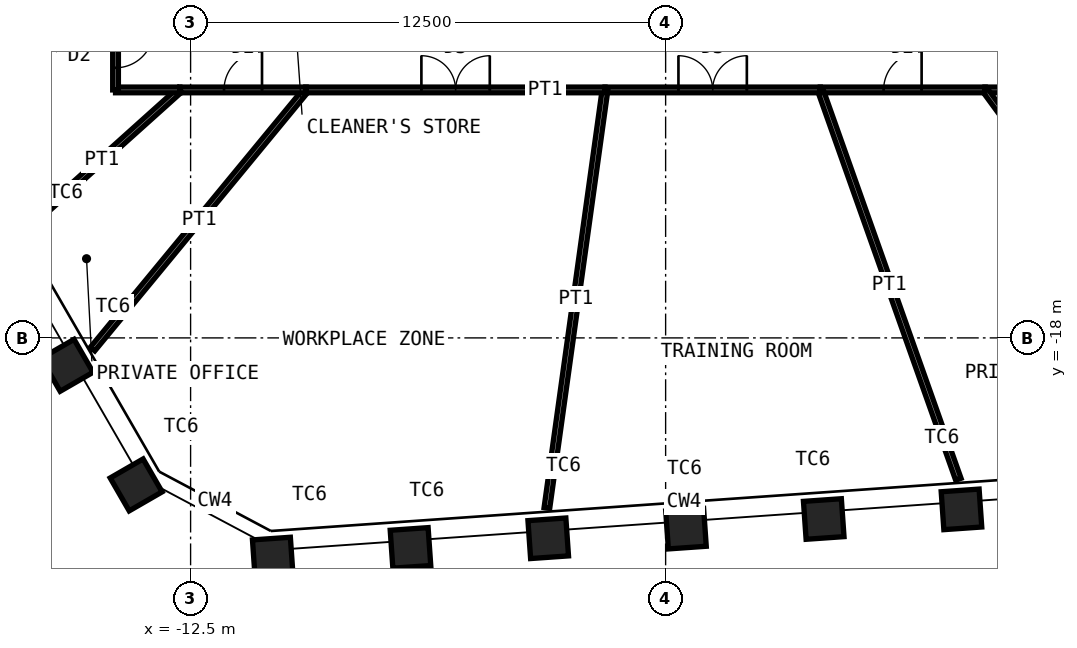
"""IFC4 building model, lengths in metres.
Left out: names, types, materials, properties, quantities, classifications, styles, units other than length and angle.
Written with IfcOpenShell. Run it as: python <this file> out.ifc"""

import sys

from ifc_helpers import new_model, si_unit, direction, frame, frame_2d, origin, origin_2d, place, context, subcontext, project, spatial, rectangle, hollow_rectangle, extrude, element, fill, save


model = new_model("IFC4")
c1 = context("Model", 3, precision=1e-05, world=origin(), true_north=direction((0.0, 1.0)))
c2 = subcontext(c1, "Body", "Model", "MODEL_VIEW")
j1 = project(units=[si_unit("LENGTHUNIT", "METRE"), si_unit("PLANEANGLEUNIT", "RADIAN")], contexts=[c1])
p1 = place(None, origin())
s1 = spatial("IfcSite", under=j1, at=p1, CompositionType="ELEMENT")
p2 = place(p1, origin())
s2 = spatial("IfcBuilding", under=s1, at=p2, CompositionType="ELEMENT")
p3 = place(p2, frame((0.0, 0.0, 235.0)))
s3 = spatial("IfcBuildingStorey", under=s2, at=p3, CompositionType="ELEMENT", Elevation=235.0)
for number, where, z_axis, x_axis in (
    (1, (7.785, -22.512, 0.0), (0.0, 0.0, 1.0), (0.998, 0.07, 0.0)),
    (2, (4.16, -22.765, 0.0), (0.0, 0.0, 1.0), (0.998, 0.07, 0.0)),
    (3, (0.536, -23.019, 0.0), (0.0, 0.0, 1.0), (0.998, 0.07, 0.0)),
    (4, (-3.089, -23.272, 0.0), (0.0, 0.0, 1.0), (0.998, 0.07, 0.0)),
    (5, (-6.714, -23.526, 0.0), (0.0, 0.0, 1.0), (0.998, 0.07, 0.0)),
    (6, (-10.338, -23.779, 0.0), (0.0, 0.0, 1.0), (0.998, 0.07, 0.0)),
    (7, (-13.933, -21.868, 0.0), (0.0, 0.0, 1.0), (0.5, -0.866, 0.0)),
    (8, (-15.749, -18.721, 0.0), (0.0, 0.0, 1.0), (0.5, -0.866, 0.0)),
):
    element("IfcColumn", number, at=place(p3, frame(where, z_axis=z_axis, x_axis=x_axis)), inside=s3, PredefinedType="COLUMN", context=c2, shape_type="SweptSolid", body=[
        extrude(hollow_rectangle(XDim=1.0, YDim=1.0, WallThickness=0.06, at=origin_2d()), origin(), (0.0, 0.0, 1.0), 4.2),
    ])
p4 = place(p3, frame((-15.08, -18.294, 0.0), z_axis=(0.0, 0.0, 1.0), x_axis=(0.636052894953, 0.771645459277, 0.0)))
e9 = element("IfcWall", 9, at=p4, inside=s3, PredefinedType="PARTITIONING", context=c2, shape_type="SweptSolid", body=[
    extrude(rectangle(XDim=8.837, YDim=0.15, at=frame_2d((4.418, 0.0))), origin(), (0.0, 0.0, 1.0), 3.43),
])
p5 = place(p3, frame((-9.459, -11.475, 0.0), z_axis=(0.0, 0.0, 1.0), x_axis=(-1.0, 0.0, 0.0)))
e10 = element("IfcWall", 10, at=p5, inside=s3, PredefinedType="PARTITIONING", context=c2, shape_type="SweptSolid", body=[
    extrude(rectangle(XDim=3.324, YDim=0.15, at=frame_2d((1.662, 0.0))), origin(), (0.0, 0.0, 1.0), 4.03),
])
p6 = place(p5, frame((1.162, 0.0, 0.0)))
e11 = element("IfcOpeningElement", 11, at=p6, cuts=e10, PredefinedType="OPENING", context=c2, shape_type="SweptSolid", body=[
    extrude(rectangle(XDim=1.0, YDim=2.4, at=frame_2d((0.5, 1.2))), frame((0.0, 0.085, 0.0), z_axis=(0.0, -1.0, 0.0), x_axis=(1.0, 0.0, 0.0)), (0.0, 0.0, 1.0), 0.17),
])
p7 = place(p3, frame((-16.885, -15.158, 0.0), z_axis=(0.0, 0.0, 1.0), x_axis=(0.744165513773, 0.667995275515, 0.0)))
e12 = element("IfcWall", 12, at=p7, inside=s3, PredefinedType="PARTITIONING", context=c2, shape_type="SweptSolid", body=[
    extrude(rectangle(XDim=5.513, YDim=0.15, at=frame_2d((2.756, 0.0))), origin(), (0.0, 0.0, 1.0), 3.43),
])
p8 = place(p3, frame((-12.783, -11.475, 0.0), z_axis=(0.0, 0.0, 1.0), x_axis=(-1.0, 0.0, 0.0)))
e13 = element("IfcWall", 13, at=p8, inside=s3, PredefinedType="PARTITIONING", context=c2, shape_type="SweptSolid", body=[
    extrude(rectangle(XDim=1.692, YDim=0.15, at=frame_2d((0.846, 0.0))), origin(), (0.0, 0.0, 1.0), 4.03),
])
p9 = place(p3, frame((-14.475, -11.475, 0.0), z_axis=(0.0, 0.0, 1.0), x_axis=(0.0, 1.0, 0.0)))
e14 = element("IfcWall", 14, at=p9, inside=s3, PredefinedType="PARTITIONING", context=c2, shape_type="SweptSolid", body=[
    extrude(rectangle(XDim=2.164, YDim=0.15, at=frame_2d((1.082, 0.0))), origin(), (0.0, 0.0, 1.0), 4.03),
])
p10 = place(p9, frame((0.582, 0.0, 0.0)))
e15 = element("IfcOpeningElement", 15, at=p10, cuts=e14, PredefinedType="OPENING", context=c2, shape_type="SweptSolid", body=[
    extrude(rectangle(XDim=1.0, YDim=2.4, at=frame_2d((0.5, 1.2))), frame((0.0, 0.085, 0.0), z_axis=(0.0, -1.0, 0.0), x_axis=(1.0, 0.0, 0.0)), (0.0, 0.0, 1.0), 0.17),
])
p11 = place(p3, frame((-18.693, -12.024, 0.0), z_axis=(0.0, 0.0, 1.0), x_axis=(0.841031335058, 0.540986407824, 0.0)))
e16 = element("IfcWall", 16, at=p11, inside=s3, PredefinedType="PARTITIONING", context=c2, shape_type="SweptSolid", body=[
    extrude(rectangle(XDim=5.015, YDim=0.15, at=frame_2d((2.507, 0.0))), origin(), (0.0, 0.0, 1.0), 3.43),
])
p12 = place(p3, frame((11.266, -11.475, 0.0), z_axis=(0.0, 0.0, 1.0), x_axis=(-1.0, 0.0, 0.0)))
e17 = element("IfcWall", 17, at=p12, inside=s3, PredefinedType="PARTITIONING", context=c2, shape_type="SweptSolid", body=[
    extrude(rectangle(XDim=2.863, YDim=0.15, at=frame_2d((1.432, 0.0))), origin(), (0.0, 0.0, 1.0), 4.03),
])
p13 = place(p12, frame((0.932, 0.0, 0.0)))
e18 = element("IfcOpeningElement", 18, at=p13, cuts=e17, PredefinedType="OPENING", context=c2, shape_type="SweptSolid", body=[
    extrude(rectangle(XDim=1.0, YDim=2.4, at=frame_2d((0.5, 1.2))), frame((0.0, 0.085, 0.0), z_axis=(0.0, -1.0, 0.0), x_axis=(1.0, 0.0, 0.0)), (0.0, 0.0, 1.0), 0.17),
])
p14 = place(p3, frame((14.339, -19.582, 0.0), z_axis=(0.0, 0.0, 1.0), x_axis=(-0.590789413226, 0.806825798559, 0.0)))
e19 = element("IfcWall", 19, at=p14, inside=s3, PredefinedType="PARTITIONING", context=c2, shape_type="SweptSolid", body=[
    extrude(rectangle(XDim=10.048, YDim=0.15, at=frame_2d((5.024, 0.0))), origin(), (0.0, 0.0, 1.0), 2.93),
])
p15 = place(p3, frame((8.403, -11.475, 0.0), z_axis=(0.0, 0.0, 1.0), x_axis=(-1.0, 0.0, 0.0)))
e20 = element("IfcWall", 20, at=p15, inside=s3, PredefinedType="PARTITIONING", context=c2, shape_type="SweptSolid", body=[
    extrude(rectangle(XDim=4.333, YDim=0.15, at=frame_2d((2.167, 0.0))), origin(), (0.0, 0.0, 1.0), 4.03),
])
p16 = place(p15, frame((1.667, 0.0, 0.0)))
e21 = element("IfcOpeningElement", 21, at=p16, cuts=e20, PredefinedType="OPENING", context=c2, shape_type="SweptSolid", body=[
    extrude(rectangle(XDim=1.0, YDim=2.4, at=frame_2d((0.5, 1.2))), frame((0.0, 0.085, 0.0), z_axis=(0.0, -1.0, 0.0), x_axis=(1.0, 0.0, 0.0)), (0.0, 0.0, 1.0), 0.17),
])
p17 = place(p3, frame((7.703, -21.719, 0.0), z_axis=(0.0, 0.0, 1.0), x_axis=(-0.334269551553, 0.942477515331, 0.0)))
e22 = element("IfcWall", 22, at=p17, inside=s3, PredefinedType="PARTITIONING", context=c2, shape_type="SweptSolid", body=[
    extrude(rectangle(XDim=10.869, YDim=0.15, at=frame_2d((5.435, 0.0))), origin(), (0.0, 0.0, 1.0), 3.43),
])
p18 = place(p3, frame((4.07, -11.475, 0.0), z_axis=(0.0, 0.0, 1.0), x_axis=(-1.0, 0.0, 0.0)))
e23 = element("IfcWall", 23, at=p18, inside=s3, PredefinedType="PARTITIONING", context=c2, shape_type="SweptSolid", body=[
    extrude(rectangle(XDim=5.665, YDim=0.15, at=frame_2d((2.832, 0.0))), origin(), (0.0, 0.0, 1.0), 4.03),
])
p19 = place(p18, frame((1.932, 0.0, 0.0)))
e24 = element("IfcOpeningElement", 24, at=p19, cuts=e23, PredefinedType="OPENING", context=c2, shape_type="SweptSolid", body=[
    extrude(rectangle(XDim=1.8, YDim=2.4, at=frame_2d((0.9, 1.2))), frame((0.0, 0.085, 0.0), z_axis=(0.0, -1.0, 0.0), x_axis=(1.0, 0.0, 0.0)), (0.0, 0.0, 1.0), 0.17),
])
p20 = place(p3, frame((-3.124, -22.475, 0.0), z_axis=(0.0, 0.0, 1.0), x_axis=(0.137683997015, 0.990476207168, 0.0)))
e25 = element("IfcWall", 25, at=p20, inside=s3, PredefinedType="PARTITIONING", context=c2, shape_type="SweptSolid", body=[
    extrude(rectangle(XDim=11.105, YDim=0.15, at=frame_2d((5.553, 0.0))), origin(), (0.0, 0.0, 1.0), 3.43),
])
p21 = place(p3, frame((-1.595, -11.475, 0.0), z_axis=(0.0, 0.0, 1.0), x_axis=(-1.0, 0.0, 0.0)))
e26 = element("IfcWall", 26, at=p21, inside=s3, PredefinedType="PARTITIONING", context=c2, shape_type="SweptSolid", body=[
    extrude(rectangle(XDim=7.864, YDim=0.15, at=frame_2d((3.932, 0.0))), origin(), (0.0, 0.0, 1.0), 4.03),
])
p22 = place(p21, frame((3.032, 0.0, 0.0)))
e27 = element("IfcOpeningElement", 27, at=p22, cuts=e26, PredefinedType="OPENING", context=c2, shape_type="SweptSolid", body=[
    extrude(rectangle(XDim=1.8, YDim=2.4, at=frame_2d((0.9, 1.2))), frame((0.0, 0.085, 0.0), z_axis=(0.0, -1.0, 0.0), x_axis=(1.0, 0.0, 0.0)), (0.0, 0.0, 1.0), 0.17),
])
p23 = place(p6, origin())
e28 = element("IfcDoor", 28, at=p23, inside=s3, OperationType="SINGLE_SWING_LEFT", PredefinedType="DOOR", context=c2, shape_type="SweptSolid", body=[
    extrude(rectangle(XDim=1.0, YDim=2.4, at=frame_2d((0.5, 1.2))), frame((0.0, 0.025, 0.0), z_axis=(0.0, -1.0, 0.0), x_axis=(1.0, 0.0, 0.0)), (0.0, 0.0, 1.0), 0.05),
])
fill(e11, e28)
p24 = place(p10, origin())
e29 = element("IfcDoor", 29, at=p24, inside=s3, OperationType="SINGLE_SWING_RIGHT", PredefinedType="DOOR", context=c2, shape_type="SweptSolid", body=[
    extrude(rectangle(XDim=1.0, YDim=2.4, at=frame_2d((0.5, 1.2))), frame((0.0, 0.025, 0.0), z_axis=(0.0, -1.0, 0.0), x_axis=(1.0, 0.0, 0.0)), (0.0, 0.0, 1.0), 0.05),
])
fill(e15, e29)
p25 = place(p16, origin())
e30 = element("IfcDoor", 30, at=p25, inside=s3, OperationType="SINGLE_SWING_LEFT", PredefinedType="DOOR", context=c2, shape_type="SweptSolid", body=[
    extrude(rectangle(XDim=1.0, YDim=2.4, at=frame_2d((0.5, 1.2))), frame((0.0, 0.025, 0.0), z_axis=(0.0, -1.0, 0.0), x_axis=(1.0, 0.0, 0.0)), (0.0, 0.0, 1.0), 0.05),
])
fill(e21, e30)
p26 = place(p19, origin())
e31 = element("IfcDoor", 31, at=p26, inside=s3, OperationType="DOUBLE_DOOR_DOUBLE_SWING", PredefinedType="DOOR", context=c2, shape_type="SweptSolid", body=[
    extrude(rectangle(XDim=1.8, YDim=2.4, at=frame_2d((0.9, 1.2))), frame((0.0, 0.025, 0.0), z_axis=(0.0, -1.0, 0.0), x_axis=(1.0, 0.0, 0.0)), (0.0, 0.0, 1.0), 0.05),
])
fill(e24, e31)
p27 = place(p22, origin())
e32 = element("IfcDoor", 32, at=p27, inside=s3, OperationType="DOUBLE_DOOR_DOUBLE_SWING", PredefinedType="DOOR", context=c2, shape_type="SweptSolid", body=[
    extrude(rectangle(XDim=1.8, YDim=2.4, at=frame_2d((0.9, 1.2))), frame((0.0, 0.025, 0.0), z_axis=(0.0, -1.0, 0.0), x_axis=(1.0, 0.0, 0.0)), (0.0, 0.0, 1.0), 0.05),
])
fill(e27, e32)
save(model, sys.argv[1])
